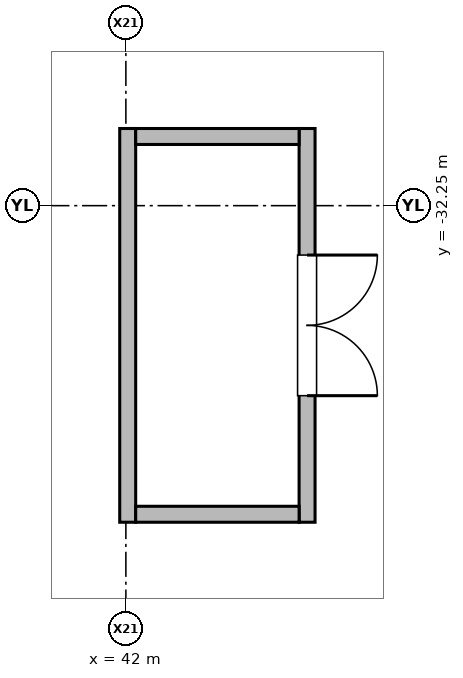
"""IFC4 building model, lengths in metres.
Left out: names, types, materials, properties, quantities, classifications, styles, units other than length and angle.
Written with IfcOpenShell. Run it as: python <this file> out.ifc"""

import sys

from ifc_helpers import new_model, si_unit, direction, frame, frame_2d, origin, place, context, subcontext, project, spatial, rectangle, extrude, element, fill, save


model = new_model("IFC4")
c1 = context("Model", 3, precision=1e-05, world=origin(), true_north=direction((0.0, 1.0)))
c2 = subcontext(c1, "Body", "Model", "MODEL_VIEW")
j1 = project(units=[si_unit("LENGTHUNIT", "METRE"), si_unit("PLANEANGLEUNIT", "RADIAN")], contexts=[c1])
p1 = place(None, origin())
s1 = spatial("IfcSite", under=j1, at=p1, CompositionType="ELEMENT")
p2 = place(p1, origin())
s2 = spatial("IfcBuilding", under=s1, at=p2, CompositionType="ELEMENT")
p3 = place(p2, frame((0.0, 0.0, -6.0)))
s3 = spatial("IfcBuildingStorey", under=s2, at=p3, CompositionType="ELEMENT", Elevation=-6.0)
p4 = place(p3, frame((44.384, -31.235, 0.0), z_axis=(0.0, 0.0, 1.0), x_axis=(0.0, -1.0, 0.0)))
e1 = element("IfcWall", 1, at=p4, inside=s3, PredefinedType="PARTITIONING", context=c2, shape_type="SweptSolid", body=[
    extrude(rectangle(XDim=5.18, YDim=0.21, at=frame_2d((2.59, 0.0))), origin(), (0.0, 0.0, 1.0), 5.02),
])
p5 = place(p4, frame((1.665, 0.0, 0.0)))
e2 = element("IfcOpeningElement", 2, at=p5, cuts=e1, PredefinedType="OPENING", context=c2, shape_type="SweptSolid", body=[
    extrude(rectangle(XDim=1.85, YDim=2.4, at=frame_2d((0.925, 1.2))), frame((0.0, 0.115, 0.0), z_axis=(0.0, -1.0, 0.0), x_axis=(1.0, 0.0, 0.0)), (0.0, 0.0, 1.0), 0.23),
])
p6 = place(p3, frame((42.024, -36.415, 0.0), z_axis=(0.0, 0.0, 1.0), x_axis=(0.0, 1.0, 0.0)))
e3 = element("IfcWall", 3, at=p6, inside=s3, PredefinedType="PARTITIONING", context=c2, shape_type="SweptSolid", body=[
    extrude(rectangle(XDim=5.18, YDim=0.21, at=frame_2d((2.59, 0.0))), origin(), (0.0, 0.0, 1.0), 5.02),
])
for number, where, z_axis, x_axis in (
    (4, (42.129, -36.31, 0.0), (0.0, 0.0, 1.0), (1.0, 0.0, 0.0)),
    (5, (42.129, -31.34, 0.0), (0.0, 0.0, 1.0), (1.0, 0.0, 0.0)),
):
    element("IfcWall", number, at=place(p3, frame(where, z_axis=z_axis, x_axis=x_axis)), inside=s3, PredefinedType="PARTITIONING", context=c2, shape_type="SweptSolid", body=[
        extrude(rectangle(XDim=2.15, YDim=0.21, at=frame_2d((1.075, 0.0))), origin(), (0.0, 0.0, 1.0), 5.02),
    ])
p7 = place(p5, origin())
e6 = element("IfcDoor", 6, at=p7, inside=s3, OperationType="DOUBLE_DOOR_SINGLE_SWING", PredefinedType="DOOR", context=c2, shape_type="SweptSolid", body=[
    extrude(rectangle(XDim=1.85, YDim=2.4, at=frame_2d((0.925, 1.2))), frame((0.0, 0.025, 0.0), z_axis=(0.0, -1.0, 0.0), x_axis=(1.0, 0.0, 0.0)), (0.0, 0.0, 1.0), 0.05),
])
fill(e2, e6)
save(model, sys.argv[1])
